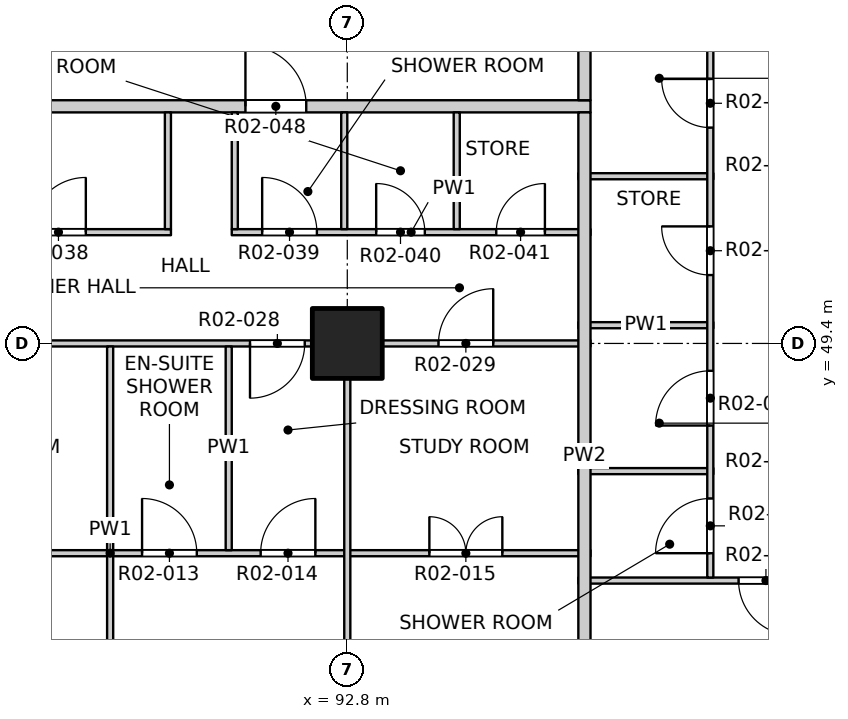
"""IFC4 building model, lengths in metres.
Left out: names, types, materials, properties, quantities, classifications, styles, units other than length and angle.
Written with IfcOpenShell. Run it as: python <this file> out.ifc"""

import sys

from ifc_helpers import new_model, si_unit, direction, frame, frame_2d, origin, origin_2d, place, context, subcontext, project, spatial, rectangle, extrude, element, fill, save


model = new_model("IFC4")
c1 = context("Model", 3, precision=1e-05, world=origin(), true_north=direction((0.0, 1.0)))
c2 = subcontext(c1, "Body", "Model", "MODEL_VIEW")
j1 = project(units=[si_unit("LENGTHUNIT", "METRE"), si_unit("PLANEANGLEUNIT", "RADIAN")], contexts=[c1])
p1 = place(None, origin())
s1 = spatial("IfcSite", under=j1, at=p1, CompositionType="ELEMENT")
p2 = place(p1, origin())
s2 = spatial("IfcBuilding", under=s1, at=p2, CompositionType="ELEMENT")
p3 = place(p2, frame((0.0, 0.0, 36.5)))
s3 = spatial("IfcBuildingStorey", under=s2, at=p3, CompositionType="ELEMENT", Elevation=36.5)
p4 = place(p3, frame((92.8, 49.4, -0.25), z_axis=(0.0, 0.0, 1.0), x_axis=(1.0, 0.0, 0.0)))
e1 = element("IfcColumn", 1, at=p4, inside=s3, PredefinedType="COLUMN", context=c2, shape_type="SweptSolid", body=[
    extrude(rectangle(XDim=1.15, YDim=1.15, at=origin_2d()), origin(), (0.0, 0.0, 1.0), 3.4),
])
p5 = place(p3, frame((96.6, 45.5, 0.0), z_axis=(0.0, 0.0, 1.0), x_axis=(1.0, 0.0, 0.0)))
e2 = element("IfcWall", 2, at=p5, inside=s3, PredefinedType="PARTITIONING", context=c2, shape_type="SweptSolid", body=[
    extrude(rectangle(XDim=11.5, YDim=0.1, at=frame_2d((5.75, 0.0))), origin(), (0.0, 0.0, 1.0), 3.15),
])
p6 = place(p5, frame((2.635, 0.0, 0.0)))
e3 = element("IfcOpeningElement", 3, at=p6, cuts=e2, PredefinedType="OPENING", context=c2, shape_type="SweptSolid", body=[
    extrude(rectangle(XDim=0.9, YDim=2.1, at=frame_2d((0.45, 1.05))), frame((0.0, 0.06, 0.0), z_axis=(0.0, -1.0, 0.0), x_axis=(1.0, 0.0, 0.0)), (0.0, 0.0, 1.0), 0.12),
])
p7 = place(p3, frame((81.0, 45.95, 0.0), z_axis=(0.0, 0.0, 1.0), x_axis=(1.0, 0.0, 0.0)))
e4 = element("IfcWall", 4, at=p7, inside=s3, PredefinedType="PARTITIONING", context=c2, shape_type="SweptSolid", body=[
    extrude(rectangle(XDim=15.8, YDim=0.1, at=frame_2d((7.9, 0.0))), origin(), (0.0, 0.0, 1.0), 3.15),
])
p8 = place(p7, frame((0.625, 0.0, 0.0)))
e5 = element("IfcOpeningElement", 5, at=p8, cuts=e4, PredefinedType="OPENING", context=c2, shape_type="SweptSolid", body=[
    extrude(rectangle(XDim=0.9, YDim=2.1, at=frame_2d((0.45, 1.05))), frame((0.0, 0.06, 0.0), z_axis=(0.0, -1.0, 0.0), x_axis=(1.0, 0.0, 0.0)), (0.0, 0.0, 1.0), 0.12),
])
p9 = place(p7, frame((2.575, 0.0, 0.0)))
e6 = element("IfcOpeningElement", 6, at=p9, cuts=e4, PredefinedType="OPENING", context=c2, shape_type="SweptSolid", body=[
    extrude(rectangle(XDim=0.9, YDim=2.1, at=frame_2d((0.45, 1.05))), frame((0.0, 0.06, 0.0), z_axis=(0.0, -1.0, 0.0), x_axis=(1.0, 0.0, 0.0)), (0.0, 0.0, 1.0), 0.12),
])
p10 = place(p7, frame((5.35, 0.0, 0.0)))
e7 = element("IfcOpeningElement", 7, at=p10, cuts=e4, PredefinedType="OPENING", context=c2, shape_type="SweptSolid", body=[
    extrude(rectangle(XDim=1.2, YDim=2.1, at=frame_2d((0.6, 1.05))), frame((0.0, 0.06, 0.0), z_axis=(0.0, -1.0, 0.0), x_axis=(1.0, 0.0, 0.0)), (0.0, 0.0, 1.0), 0.12),
])
p11 = place(p7, frame((8.425, 0.0, 0.0)))
e8 = element("IfcOpeningElement", 8, at=p11, cuts=e4, PredefinedType="OPENING", context=c2, shape_type="SweptSolid", body=[
    extrude(rectangle(XDim=0.9, YDim=2.1, at=frame_2d((0.45, 1.05))), frame((0.0, 0.06, 0.0), z_axis=(0.0, -1.0, 0.0), x_axis=(1.0, 0.0, 0.0)), (0.0, 0.0, 1.0), 0.12),
])
p12 = place(p7, frame((10.375, 0.0, 0.0)))
e9 = element("IfcOpeningElement", 9, at=p12, cuts=e4, PredefinedType="OPENING", context=c2, shape_type="SweptSolid", body=[
    extrude(rectangle(XDim=0.9, YDim=2.1, at=frame_2d((0.45, 1.05))), frame((0.0, 0.06, 0.0), z_axis=(0.0, -1.0, 0.0), x_axis=(1.0, 0.0, 0.0)), (0.0, 0.0, 1.0), 0.12),
])
p13 = place(p7, frame((13.15, 0.0, 0.0)))
e10 = element("IfcOpeningElement", 10, at=p13, cuts=e4, PredefinedType="OPENING", context=c2, shape_type="SweptSolid", body=[
    extrude(rectangle(XDim=1.2, YDim=2.1, at=frame_2d((0.6, 1.05))), frame((0.0, 0.06, 0.0), z_axis=(0.0, -1.0, 0.0), x_axis=(1.0, 0.0, 0.0)), (0.0, 0.0, 1.0), 0.12),
])
p14 = place(p3, frame((96.6, 47.3, 0.0), z_axis=(0.0, 0.0, 1.0), x_axis=(1.0, 0.0, 0.0)))
e11 = element("IfcWall", 11, at=p14, inside=s3, PredefinedType="PARTITIONING", context=c2, shape_type="SweptSolid", body=[
    extrude(rectangle(XDim=2.22, YDim=0.1, at=frame_2d((1.11, 0.0))), origin(), (0.0, 0.0, 1.0), 3.15),
])
p15 = place(p3, frame((73.2, 49.4, 0.0), z_axis=(0.0, 0.0, 1.0), x_axis=(1.0, 0.0, 0.0)))
e12 = element("IfcWall", 12, at=p15, inside=s3, PredefinedType="PARTITIONING", context=c2, shape_type="SweptSolid", body=[
    extrude(rectangle(XDim=23.6, YDim=0.1, at=frame_2d((11.8, 0.0))), origin(), (0.0, 0.0, 1.0), 3.15),
])
p16 = place(p15, frame((1.6, 0.0, 0.0)))
e13 = element("IfcOpeningElement", 13, at=p16, cuts=e12, PredefinedType="OPENING", context=c2, shape_type="SweptSolid", body=[
    extrude(rectangle(XDim=0.9, YDim=2.1, at=frame_2d((0.45, 1.05))), frame((0.0, 0.06, 0.0), z_axis=(0.0, -1.0, 0.0), x_axis=(1.0, 0.0, 0.0)), (0.0, 0.0, 1.0), 0.12),
])
p17 = place(p15, frame((6.475, 0.0, 0.0)))
e14 = element("IfcOpeningElement", 14, at=p17, cuts=e12, PredefinedType="OPENING", context=c2, shape_type="SweptSolid", body=[
    extrude(rectangle(XDim=0.9, YDim=2.1, at=frame_2d((0.45, 1.05))), frame((0.0, 0.06, 0.0), z_axis=(0.0, -1.0, 0.0), x_axis=(1.0, 0.0, 0.0)), (0.0, 0.0, 1.0), 0.12),
])
p18 = place(p15, frame((10.2, 0.0, 0.0)))
e15 = element("IfcOpeningElement", 15, at=p18, cuts=e12, PredefinedType="OPENING", context=c2, shape_type="SweptSolid", body=[
    extrude(rectangle(XDim=0.9, YDim=2.1, at=frame_2d((0.45, 1.05))), frame((0.0, 0.06, 0.0), z_axis=(0.0, -1.0, 0.0), x_axis=(1.0, 0.0, 0.0)), (0.0, 0.0, 1.0), 0.12),
])
p19 = place(p15, frame((13.3, 0.0, 0.0)))
e16 = element("IfcOpeningElement", 16, at=p19, cuts=e12, PredefinedType="OPENING", context=c2, shape_type="SweptSolid", body=[
    extrude(rectangle(XDim=0.9, YDim=2.1, at=frame_2d((0.45, 1.05))), frame((0.0, 0.06, 0.0), z_axis=(0.0, -1.0, 0.0), x_axis=(1.0, 0.0, 0.0)), (0.0, 0.0, 1.0), 0.12),
])
p20 = place(p15, frame((18.0, 0.0, 0.0)))
e17 = element("IfcOpeningElement", 17, at=p20, cuts=e12, PredefinedType="OPENING", context=c2, shape_type="SweptSolid", body=[
    extrude(rectangle(XDim=0.9, YDim=2.1, at=frame_2d((0.45, 1.05))), frame((0.0, 0.06, 0.0), z_axis=(0.0, -1.0, 0.0), x_axis=(1.0, 0.0, 0.0)), (0.0, 0.0, 1.0), 0.12),
])
p21 = place(p15, frame((21.1, 0.0, 0.0)))
e18 = element("IfcOpeningElement", 18, at=p21, cuts=e12, PredefinedType="OPENING", context=c2, shape_type="SweptSolid", body=[
    extrude(rectangle(XDim=0.9, YDim=2.1, at=frame_2d((0.45, 1.05))), frame((0.0, 0.06, 0.0), z_axis=(0.0, -1.0, 0.0), x_axis=(1.0, 0.0, 0.0)), (0.0, 0.0, 1.0), 0.12),
])
p22 = place(p3, frame((96.6, 49.7, 0.0), z_axis=(0.0, 0.0, 1.0), x_axis=(1.0, 0.0, 0.0)))
e19 = element("IfcWall", 19, at=p22, inside=s3, PredefinedType="PARTITIONING", context=c2, shape_type="SweptSolid", body=[
    extrude(rectangle(XDim=2.22, YDim=0.1, at=frame_2d((1.11, 0.0))), origin(), (0.0, 0.0, 1.0), 3.15),
])
p23 = place(p3, frame((78.9, 51.23, 0.0), z_axis=(0.0, 0.0, 1.0), x_axis=(1.0, 0.0, 0.0)))
e20 = element("IfcWall", 20, at=p23, inside=s3, PredefinedType="PARTITIONING", context=c2, shape_type="SweptSolid", body=[
    extrude(rectangle(XDim=11.0, YDim=0.1, at=frame_2d((5.5, 0.0))), origin(), (0.0, 0.0, 1.0), 3.15),
])
p24 = place(p23, frame((0.725, 0.0, 0.0)))
e21 = element("IfcOpeningElement", 21, at=p24, cuts=e20, PredefinedType="OPENING", context=c2, shape_type="SweptSolid", body=[
    extrude(rectangle(XDim=0.8, YDim=2.1, at=frame_2d((0.4, 1.05))), frame((0.0, 0.06, 0.0), z_axis=(0.0, -1.0, 0.0), x_axis=(1.0, 0.0, 0.0)), (0.0, 0.0, 1.0), 0.12),
])
p25 = place(p23, frame((2.95, 0.0, 0.0)))
e22 = element("IfcOpeningElement", 22, at=p25, cuts=e20, PredefinedType="OPENING", context=c2, shape_type="SweptSolid", body=[
    extrude(rectangle(XDim=0.9, YDim=2.1, at=frame_2d((0.45, 1.05))), frame((0.0, 0.06, 0.0), z_axis=(0.0, -1.0, 0.0), x_axis=(1.0, 0.0, 0.0)), (0.0, 0.0, 1.0), 0.12),
])
p26 = place(p23, frame((5.575, 0.0, 0.0)))
e23 = element("IfcOpeningElement", 23, at=p26, cuts=e20, PredefinedType="OPENING", context=c2, shape_type="SweptSolid", body=[
    extrude(rectangle(XDim=0.8, YDim=2.1, at=frame_2d((0.4, 1.05))), frame((0.0, 0.06, 0.0), z_axis=(0.0, -1.0, 0.0), x_axis=(1.0, 0.0, 0.0)), (0.0, 0.0, 1.0), 0.12),
])
p27 = place(p23, frame((8.7, 0.0, 0.0)))
e24 = element("IfcOpeningElement", 24, at=p27, cuts=e20, PredefinedType="OPENING", context=c2, shape_type="SweptSolid", body=[
    extrude(rectangle(XDim=0.9, YDim=2.1, at=frame_2d((0.45, 1.05))), frame((0.0, 0.06, 0.0), z_axis=(0.0, -1.0, 0.0), x_axis=(1.0, 0.0, 0.0)), (0.0, 0.0, 1.0), 0.12),
])
p28 = place(p3, frame((90.9, 51.23, 0.0), z_axis=(0.0, 0.0, 1.0), x_axis=(1.0, 0.0, 0.0)))
e25 = element("IfcWall", 25, at=p28, inside=s3, PredefinedType="PARTITIONING", context=c2, shape_type="SweptSolid", body=[
    extrude(rectangle(XDim=5.9, YDim=0.1, at=frame_2d((2.95, 0.0))), origin(), (0.0, 0.0, 1.0), 3.15),
])
p29 = place(p28, frame((0.5, 0.0, 0.0)))
e26 = element("IfcOpeningElement", 26, at=p29, cuts=e25, PredefinedType="OPENING", context=c2, shape_type="SweptSolid", body=[
    extrude(rectangle(XDim=0.9, YDim=2.1, at=frame_2d((0.45, 1.05))), frame((0.0, 0.06, 0.0), z_axis=(0.0, -1.0, 0.0), x_axis=(1.0, 0.0, 0.0)), (0.0, 0.0, 1.0), 0.12),
])
p30 = place(p28, frame((2.375, 0.0, 0.0)))
e27 = element("IfcOpeningElement", 27, at=p30, cuts=e25, PredefinedType="OPENING", context=c2, shape_type="SweptSolid", body=[
    extrude(rectangle(XDim=0.8, YDim=2.1, at=frame_2d((0.4, 1.05))), frame((0.0, 0.06, 0.0), z_axis=(0.0, -1.0, 0.0), x_axis=(1.0, 0.0, 0.0)), (0.0, 0.0, 1.0), 0.12),
])
p31 = place(p28, frame((4.35, 0.0, 0.0)))
e28 = element("IfcOpeningElement", 28, at=p31, cuts=e25, PredefinedType="OPENING", context=c2, shape_type="SweptSolid", body=[
    extrude(rectangle(XDim=0.8, YDim=2.1, at=frame_2d((0.4, 1.05))), frame((0.0, 0.06, 0.0), z_axis=(0.0, -1.0, 0.0), x_axis=(1.0, 0.0, 0.0)), (0.0, 0.0, 1.0), 0.12),
])
p32 = place(p3, frame((96.6, 52.15, 0.0), z_axis=(0.0, 0.0, 1.0), x_axis=(1.0, 0.0, 0.0)))
e29 = element("IfcWall", 29, at=p32, inside=s3, PredefinedType="PARTITIONING", context=c2, shape_type="SweptSolid", body=[
    extrude(rectangle(XDim=2.22, YDim=0.1, at=frame_2d((1.11, 0.0))), origin(), (0.0, 0.0, 1.0), 3.15),
])
p33 = place(p3, frame((73.2, 53.3, 0.0), z_axis=(0.0, 0.0, 1.0), x_axis=(1.0, 0.0, 0.0)))
e30 = element("IfcWall", 30, at=p33, inside=s3, PredefinedType="PARTITIONING", context=c2, shape_type="SweptSolid", body=[
    extrude(rectangle(XDim=23.6, YDim=0.2, at=frame_2d((11.8, 0.0))), origin(), (0.0, 0.0, 1.0), 3.15),
])
p34 = place(p33, frame((5.925, 0.0, 0.0)))
e31 = element("IfcOpeningElement", 31, at=p34, cuts=e30, PredefinedType="OPENING", context=c2, shape_type="SweptSolid", body=[
    extrude(rectangle(XDim=1.0, YDim=2.1, at=frame_2d((0.5, 1.05))), frame((0.0, 0.11, 0.0), z_axis=(0.0, -1.0, 0.0), x_axis=(1.0, 0.0, 0.0)), (0.0, 0.0, 1.0), 0.22),
])
p35 = place(p33, frame((17.925, 0.0, 0.0)))
e32 = element("IfcOpeningElement", 32, at=p35, cuts=e30, PredefinedType="OPENING", context=c2, shape_type="SweptSolid", body=[
    extrude(rectangle(XDim=1.0, YDim=2.1, at=frame_2d((0.5, 1.05))), frame((0.0, 0.11, 0.0), z_axis=(0.0, -1.0, 0.0), x_axis=(1.0, 0.0, 0.0)), (0.0, 0.0, 1.0), 0.22),
])
p36 = place(p3, frame((88.9, 41.9, 0.0), z_axis=(0.0, 0.0, 1.0), x_axis=(0.0, 1.0, 0.0)))
e33 = element("IfcWall", 33, at=p36, inside=s3, PredefinedType="PARTITIONING", context=c2, shape_type="SweptSolid", body=[
    extrude(rectangle(XDim=7.45, YDim=0.1, at=frame_2d((3.725, 0.0))), origin(), (0.0, 0.0, 1.0), 3.15),
])
p37 = place(p3, frame((89.85, 51.28, 0.0), z_axis=(0.0, 0.0, 1.0), x_axis=(0.0, 1.0, 0.0)))
e34 = element("IfcWall", 34, at=p37, inside=s3, PredefinedType="PARTITIONING", context=c2, shape_type="SweptSolid", body=[
    extrude(rectangle(XDim=1.92, YDim=0.1, at=frame_2d((0.96, 0.0))), origin(), (0.0, 0.0, 1.0), 3.15),
])
p38 = place(p3, frame((90.85, 46.0, 0.0), z_axis=(0.0, 0.0, 1.0), x_axis=(0.0, 1.0, 0.0)))
e35 = element("IfcWall", 35, at=p38, inside=s3, PredefinedType="PARTITIONING", context=c2, shape_type="SweptSolid", body=[
    extrude(rectangle(XDim=3.35, YDim=0.1, at=frame_2d((1.675, 0.0))), origin(), (0.0, 0.0, 1.0), 3.15),
])
for number, where, z_axis, x_axis in (
    (36, (90.95, 51.28, 0.0), (0.0, 0.0, 1.0), (0.0, 1.0, 0.0)),
    (37, (92.75, 51.28, 0.0), (0.0, 0.0, 1.0), (0.0, 1.0, 0.0)),
):
    element("IfcWall", number, at=place(p3, frame(where, z_axis=z_axis, x_axis=x_axis)), inside=s3, PredefinedType="PARTITIONING", context=c2, shape_type="SweptSolid", body=[
        extrude(rectangle(XDim=1.92, YDim=0.1, at=frame_2d((0.96, 0.0))), origin(), (0.0, 0.0, 1.0), 3.15),
    ])
p39 = place(p3, frame((92.8, 41.9, 0.0), z_axis=(0.0, 0.0, 1.0), x_axis=(0.0, 1.0, 0.0)))
e38 = element("IfcWall", 38, at=p39, inside=s3, PredefinedType="PARTITIONING", context=c2, shape_type="SweptSolid", body=[
    extrude(rectangle(XDim=7.45, YDim=0.1, at=frame_2d((3.725, 0.0))), origin(), (0.0, 0.0, 1.0), 2.55),
])
p40 = place(p3, frame((94.6, 51.28, 0.0), z_axis=(0.0, 0.0, 1.0), x_axis=(0.0, 1.0, 0.0)))
e39 = element("IfcWall", 39, at=p40, inside=s3, PredefinedType="PARTITIONING", context=c2, shape_type="SweptSolid", body=[
    extrude(rectangle(XDim=1.92, YDim=0.1, at=frame_2d((0.96, 0.0))), origin(), (0.0, 0.0, 1.0), 3.15),
])
p41 = place(p3, frame((96.7, 41.9, 0.0), z_axis=(0.0, 0.0, 1.0), x_axis=(0.0, 1.0, 0.0)))
e40 = element("IfcWall", 40, at=p41, inside=s3, PredefinedType="PARTITIONING", context=c2, shape_type="SweptSolid", body=[
    extrude(rectangle(XDim=11.3, YDim=0.2, at=frame_2d((5.65, 0.0))), origin(), (0.0, 0.0, 1.0), 3.15),
])
p42 = place(p3, frame((96.7, 53.4, 0.0), z_axis=(0.0, 0.0, 1.0), x_axis=(0.0, 1.0, 0.0)))
e41 = element("IfcWall", 41, at=p42, inside=s3, PredefinedType="PARTITIONING", context=c2, shape_type="SweptSolid", body=[
    extrude(rectangle(XDim=31.0, YDim=0.2, at=frame_2d((15.5, 0.0))), origin(), (0.0, 0.0, 1.0), 3.15),
])
p43 = place(p42, frame((2.425, 0.0, 0.0)))
e42 = element("IfcOpeningElement", 42, at=p43, cuts=e41, PredefinedType="OPENING", context=c2, shape_type="SweptSolid", body=[
    extrude(rectangle(XDim=1.0, YDim=2.1, at=frame_2d((0.5, 1.05))), frame((0.0, 0.11, 0.0), z_axis=(0.0, -1.0, 0.0), x_axis=(1.0, 0.0, 0.0)), (0.0, 0.0, 1.0), 0.22),
])
p44 = place(p42, frame((13.375, 0.0, 0.0)))
e43 = element("IfcOpeningElement", 43, at=p44, cuts=e41, PredefinedType="OPENING", context=c2, shape_type="SweptSolid", body=[
    extrude(rectangle(XDim=1.0, YDim=2.1, at=frame_2d((0.5, 1.05))), frame((0.0, 0.11, 0.0), z_axis=(0.0, -1.0, 0.0), x_axis=(1.0, 0.0, 0.0)), (0.0, 0.0, 1.0), 0.22),
])
p45 = place(p42, frame((29.525, 0.0, 0.0)))
e44 = element("IfcOpeningElement", 44, at=p45, cuts=e41, PredefinedType="OPENING", context=c2, shape_type="SweptSolid", body=[
    extrude(rectangle(XDim=1.0, YDim=2.1, at=frame_2d((0.5, 1.05))), frame((0.0, 0.11, 0.0), z_axis=(0.0, -1.0, 0.0), x_axis=(1.0, 0.0, 0.0)), (0.0, 0.0, 1.0), 0.22),
])
p46 = place(p3, frame((98.77, 45.55, 0.0), z_axis=(0.0, 0.0, 1.0), x_axis=(0.0, 1.0, 0.0)))
e45 = element("IfcWall", 45, at=p46, inside=s3, PredefinedType="PARTITIONING", context=c2, shape_type="SweptSolid", body=[
    extrude(rectangle(XDim=8.95, YDim=0.1, at=frame_2d((4.475, 0.0))), origin(), (0.0, 0.0, 1.0), 3.15),
])
p47 = place(p46, frame((0.4, 0.0, 0.0)))
e46 = element("IfcOpeningElement", 46, at=p47, cuts=e45, PredefinedType="OPENING", context=c2, shape_type="SweptSolid", body=[
    extrude(rectangle(XDim=0.9, YDim=2.1, at=frame_2d((0.45, 1.05))), frame((0.0, 0.06, 0.0), z_axis=(0.0, -1.0, 0.0), x_axis=(1.0, 0.0, 0.0)), (0.0, 0.0, 1.0), 0.12),
])
p48 = place(p46, frame((2.5, 0.0, 0.0)))
e47 = element("IfcOpeningElement", 47, at=p48, cuts=e45, PredefinedType="OPENING", context=c2, shape_type="SweptSolid", body=[
    extrude(rectangle(XDim=0.9, YDim=2.1, at=frame_2d((0.45, 1.05))), frame((0.0, 0.06, 0.0), z_axis=(0.0, -1.0, 0.0), x_axis=(1.0, 0.0, 0.0)), (0.0, 0.0, 1.0), 0.12),
])
p49 = place(p46, frame((4.975, 0.0, 0.0)))
e48 = element("IfcOpeningElement", 48, at=p49, cuts=e45, PredefinedType="OPENING", context=c2, shape_type="SweptSolid", body=[
    extrude(rectangle(XDim=0.8, YDim=2.1, at=frame_2d((0.4, 1.05))), frame((0.0, 0.06, 0.0), z_axis=(0.0, -1.0, 0.0), x_axis=(1.0, 0.0, 0.0)), (0.0, 0.0, 1.0), 0.12),
])
p50 = place(p46, frame((7.4, 0.0, 0.0)))
e49 = element("IfcOpeningElement", 49, at=p50, cuts=e45, PredefinedType="OPENING", context=c2, shape_type="SweptSolid", body=[
    extrude(rectangle(XDim=0.8, YDim=2.1, at=frame_2d((0.4, 1.05))), frame((0.0, 0.06, 0.0), z_axis=(0.0, -1.0, 0.0), x_axis=(1.0, 0.0, 0.0)), (0.0, 0.0, 1.0), 0.12),
])
p51 = place(p6, origin())
e50 = element("IfcDoor", 50, at=p51, inside=s3, OperationType="SINGLE_SWING_LEFT", PredefinedType="DOOR", context=c2, shape_type="SweptSolid", body=[
    extrude(rectangle(XDim=0.9, YDim=2.1, at=frame_2d((0.45, 1.05))), frame((0.0, 0.025, 0.0), z_axis=(0.0, -1.0, 0.0), x_axis=(1.0, 0.0, 0.0)), (0.0, 0.0, 1.0), 0.05),
])
fill(e3, e50)
p52 = place(p11, origin())
e51 = element("IfcDoor", 51, at=p52, inside=s3, OperationType="SINGLE_SWING_LEFT", PredefinedType="DOOR", context=c2, shape_type="SweptSolid", body=[
    extrude(rectangle(XDim=0.9, YDim=2.1, at=frame_2d((0.45, 1.05))), frame((0.0, 0.025, 0.0), z_axis=(0.0, -1.0, 0.0), x_axis=(1.0, 0.0, 0.0)), (0.0, 0.0, 1.0), 0.05),
])
fill(e8, e51)
p53 = place(p12, origin())
e52 = element("IfcDoor", 52, at=p53, inside=s3, OperationType="SINGLE_SWING_RIGHT", PredefinedType="DOOR", context=c2, shape_type="SweptSolid", body=[
    extrude(rectangle(XDim=0.9, YDim=2.1, at=frame_2d((0.45, 1.05))), frame((0.0, 0.025, 0.0), z_axis=(0.0, -1.0, 0.0), x_axis=(1.0, 0.0, 0.0)), (0.0, 0.0, 1.0), 0.05),
])
fill(e9, e52)
p54 = place(p13, origin())
e53 = element("IfcDoor", 53, at=p54, inside=s3, OperationType="DOUBLE_DOOR_SINGLE_SWING", PredefinedType="DOOR", context=c2, shape_type="SweptSolid", body=[
    extrude(rectangle(XDim=1.2, YDim=2.1, at=frame_2d((0.6, 1.05))), frame((0.0, 0.025, 0.0), z_axis=(0.0, -1.0, 0.0), x_axis=(1.0, 0.0, 0.0)), (0.0, 0.0, 1.0), 0.05),
])
fill(e10, e53)
p55 = place(p47, origin())
e54 = element("IfcDoor", 54, at=p55, inside=s3, OperationType="SINGLE_SWING_LEFT", PredefinedType="DOOR", context=c2, shape_type="SweptSolid", body=[
    extrude(rectangle(XDim=0.9, YDim=2.1, at=frame_2d((0.45, 1.05))), frame((0.0, 0.025, 0.0), z_axis=(0.0, -1.0, 0.0), x_axis=(1.0, 0.0, 0.0)), (0.0, 0.0, 1.0), 0.05),
])
fill(e46, e54)
p56 = place(p48, origin())
e55 = element("IfcDoor", 55, at=p56, inside=s3, OperationType="SINGLE_SWING_LEFT", PredefinedType="DOOR", context=c2, shape_type="SweptSolid", body=[
    extrude(rectangle(XDim=0.9, YDim=2.1, at=frame_2d((0.45, 1.05))), frame((0.0, 0.025, 0.0), z_axis=(0.0, -1.0, 0.0), x_axis=(1.0, 0.0, 0.0)), (0.0, 0.0, 1.0), 0.05),
])
fill(e47, e55)
p57 = place(p20, origin())
e56 = element("IfcDoor", 56, at=p57, inside=s3, OperationType="SINGLE_SWING_RIGHT", PredefinedType="DOOR", context=c2, shape_type="SweptSolid", body=[
    extrude(rectangle(XDim=0.9, YDim=2.1, at=frame_2d((0.45, 1.05))), frame((0.0, 0.025, 0.0), z_axis=(0.0, -1.0, 0.0), x_axis=(1.0, 0.0, 0.0)), (0.0, 0.0, 1.0), 0.05),
])
fill(e17, e56)
p58 = place(p21, origin())
e57 = element("IfcDoor", 57, at=p58, inside=s3, OperationType="SINGLE_SWING_RIGHT", PredefinedType="DOOR", context=c2, shape_type="SweptSolid", body=[
    extrude(rectangle(XDim=0.9, YDim=2.1, at=frame_2d((0.45, 1.05))), frame((0.0, 0.025, 0.0), z_axis=(0.0, -1.0, 0.0), x_axis=(1.0, 0.0, 0.0)), (0.0, 0.0, 1.0), 0.05),
])
fill(e18, e57)
p59 = place(p49, origin())
e58 = element("IfcDoor", 58, at=p59, inside=s3, OperationType="SINGLE_SWING_RIGHT", PredefinedType="DOOR", context=c2, shape_type="SweptSolid", body=[
    extrude(rectangle(XDim=0.8, YDim=2.1, at=frame_2d((0.4, 1.05))), frame((0.0, 0.025, 0.0), z_axis=(0.0, -1.0, 0.0), x_axis=(1.0, 0.0, 0.0)), (0.0, 0.0, 1.0), 0.05),
])
fill(e48, e58)
p60 = place(p27, origin())
e59 = element("IfcDoor", 59, at=p60, inside=s3, OperationType="SINGLE_SWING_RIGHT", PredefinedType="DOOR", context=c2, shape_type="SweptSolid", body=[
    extrude(rectangle(XDim=0.9, YDim=2.1, at=frame_2d((0.45, 1.05))), frame((0.0, 0.025, 0.0), z_axis=(0.0, -1.0, 0.0), x_axis=(1.0, 0.0, 0.0)), (0.0, 0.0, 1.0), 0.05),
])
fill(e24, e59)
p61 = place(p29, origin())
e60 = element("IfcDoor", 60, at=p61, inside=s3, OperationType="SINGLE_SWING_LEFT", PredefinedType="DOOR", context=c2, shape_type="SweptSolid", body=[
    extrude(rectangle(XDim=0.9, YDim=2.1, at=frame_2d((0.45, 1.05))), frame((0.0, 0.025, 0.0), z_axis=(0.0, -1.0, 0.0), x_axis=(1.0, 0.0, 0.0)), (0.0, 0.0, 1.0), 0.05),
])
fill(e26, e60)
p62 = place(p30, origin())
e61 = element("IfcDoor", 61, at=p62, inside=s3, OperationType="SINGLE_SWING_LEFT", PredefinedType="DOOR", context=c2, shape_type="SweptSolid", body=[
    extrude(rectangle(XDim=0.8, YDim=2.1, at=frame_2d((0.4, 1.05))), frame((0.0, 0.025, 0.0), z_axis=(0.0, -1.0, 0.0), x_axis=(1.0, 0.0, 0.0)), (0.0, 0.0, 1.0), 0.05),
])
fill(e27, e61)
p63 = place(p31, origin())
e62 = element("IfcDoor", 62, at=p63, inside=s3, OperationType="SINGLE_SWING_RIGHT", PredefinedType="DOOR", context=c2, shape_type="SweptSolid", body=[
    extrude(rectangle(XDim=0.8, YDim=2.1, at=frame_2d((0.4, 1.05))), frame((0.0, 0.025, 0.0), z_axis=(0.0, -1.0, 0.0), x_axis=(1.0, 0.0, 0.0)), (0.0, 0.0, 1.0), 0.05),
])
fill(e28, e62)
p64 = place(p35, origin())
e63 = element("IfcDoor", 63, at=p64, inside=s3, OperationType="SINGLE_SWING_LEFT", PredefinedType="DOOR", context=c2, shape_type="SweptSolid", body=[
    extrude(rectangle(XDim=1.0, YDim=2.1, at=frame_2d((0.5, 1.05))), frame((0.0, 0.025, 0.0), z_axis=(0.0, -1.0, 0.0), x_axis=(1.0, 0.0, 0.0)), (0.0, 0.0, 1.0), 0.05),
])
fill(e32, e63)
p65 = place(p50, origin())
e64 = element("IfcDoor", 64, at=p65, inside=s3, OperationType="SINGLE_SWING_RIGHT", PredefinedType="DOOR", context=c2, shape_type="SweptSolid", body=[
    extrude(rectangle(XDim=0.8, YDim=2.1, at=frame_2d((0.4, 1.05))), frame((0.0, 0.025, 0.0), z_axis=(0.0, -1.0, 0.0), x_axis=(1.0, 0.0, 0.0)), (0.0, 0.0, 1.0), 0.05),
])
fill(e49, e64)
save(model, sys.argv[1])
